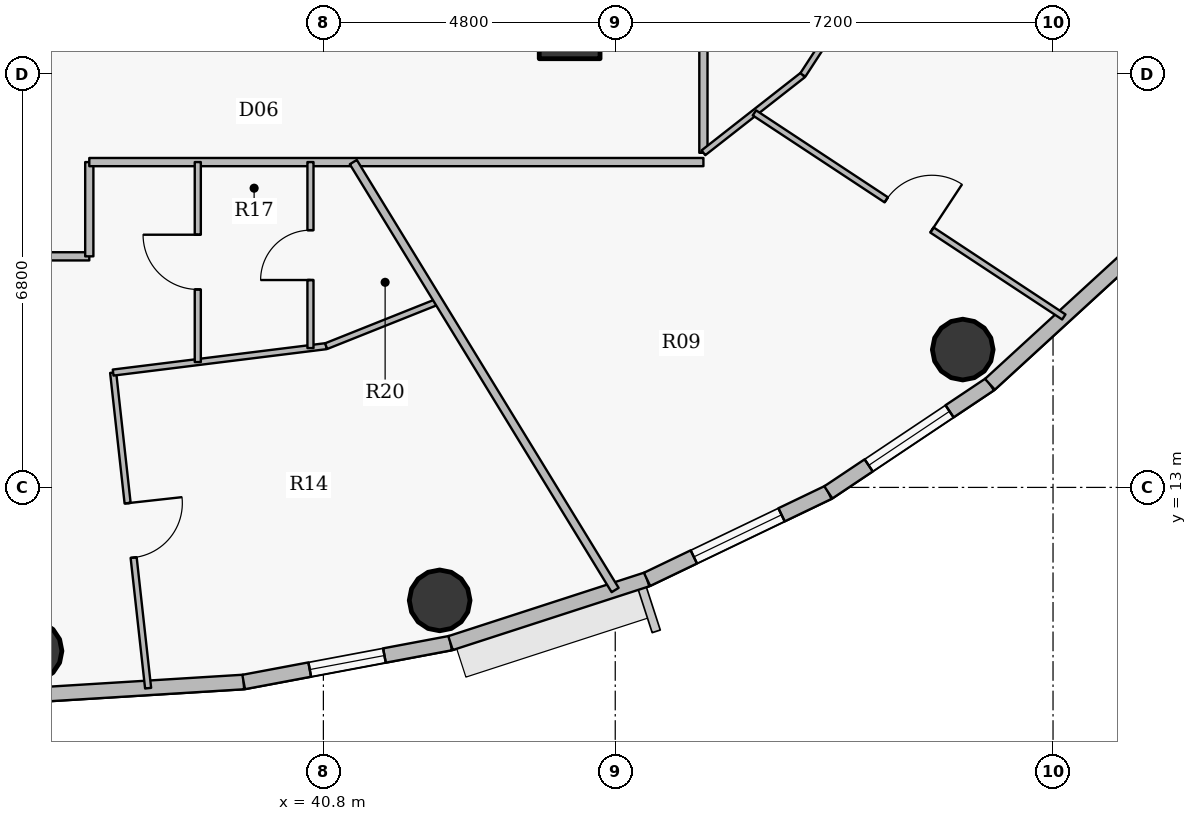
"""IFC4 building model, lengths in metres.
Left out: names, types, materials, properties, quantities, classifications, styles, units other than length and angle.
Written with IfcOpenShell. Run it as: python <this file> out.ifc"""

import sys

from ifc_helpers import new_model, si_unit, direction, frame, frame_2d, origin, origin_2d, place, context, subcontext, project, spatial, rectangle, hollow_circle, extrude, source, transform, mapped, element, fill, save


model = new_model("IFC4")
c1 = context("Model", 3, precision=1e-05, world=origin(), true_north=direction((0.0, 1.0)))
c2 = subcontext(c1, "Body", "Model", "MODEL_VIEW")
j1 = project(units=[si_unit("LENGTHUNIT", "METRE"), si_unit("PLANEANGLEUNIT", "RADIAN")], contexts=[c1])
p1 = place(None, origin())
s1 = spatial("IfcSite", under=j1, at=p1, CompositionType="ELEMENT")
p2 = place(p1, origin())
s2 = spatial("IfcBuilding", under=s1, at=p2, CompositionType="ELEMENT")
p3 = place(p2, frame((0.0, 0.0, 284.25)))
s3 = spatial("IfcBuildingStorey", under=s2, at=p3, CompositionType="ELEMENT", Elevation=284.25)
p4 = place(p3, frame((44.85, 20.55, 0.0), z_axis=(0.0, 0.0, 1.0), x_axis=(1.0, 0.0, 0.0)))
e1 = element("IfcColumn", 1, at=p4, inside=s3, PredefinedType="COLUMN", context=c2, shape_type="SweptSolid", body=[
    extrude(rectangle(XDim=1.0, YDim=1.0, at=origin_2d()), origin(), (0.0, 0.0, 1.0), 3.75),
])
for number, where, z_axis, x_axis in (
    (2, (36.0, 10.31, 0.0), (0.0, 0.0, 1.0), (1.0, 0.0, 0.0)),
    (3, (42.712, 11.142, 0.0), (0.0, 0.0, 1.0), (1.0, 0.0, 0.0)),
    (4, (51.315, 15.267, 0.0), (0.0, 0.0, 1.0), (1.0, 0.0, 0.0)),
):
    element("IfcColumn", number, at=place(p3, frame(where, z_axis=z_axis, x_axis=x_axis)), inside=s3, PredefinedType="COLUMN", context=c2, shape_type="SweptSolid", body=[
        extrude(hollow_circle(Radius=0.5, WallThickness=0.032, at=origin_2d()), origin(), (0.0, 0.0, 1.0), 3.75),
    ])
p5 = place(p3, frame((39.489, 9.8, 0.0), z_axis=(0.0, 0.0, 1.0), x_axis=(-0.998104946479, -0.061534671648, 0.0)))
e5 = element("IfcWall", 5, at=p5, inside=s3, PredefinedType="SOLIDWALL", context=c2, shape_type="SweptSolid", body=[
    extrude(rectangle(XDim=3.495, YDim=0.24, at=frame_2d((1.748, 0.0))), origin(), (0.0, 0.0, 1.0), 3.5),
])
p6 = place(p3, frame((42.891, 10.44, 0.0), z_axis=(0.0, 0.0, 1.0), x_axis=(-0.982782655757, -0.184765395959, 0.0)))
e6 = element("IfcWall", 6, at=p6, inside=s3, PredefinedType="SOLIDWALL", context=c2, shape_type="SweptSolid", body=[
    extrude(rectangle(XDim=3.462, YDim=0.24, at=frame_2d((1.731, 0.0))), origin(), (0.0, 0.0, 1.0), 3.5),
])
p7 = place(p6, frame((1.106, 0.0, 0.9)))
e7 = element("IfcOpeningElement", 7, at=p7, cuts=e6, PredefinedType="OPENING", context=c2, shape_type="SweptSolid", body=[
    extrude(rectangle(XDim=1.25, YDim=1.65, at=origin_2d()), frame((0.625, 0.13, 0.825), z_axis=(0.0, -1.0, 0.0), x_axis=(1.0, 0.0, 0.0)), (0.0, 0.0, 1.0), 0.26),
])
p8 = place(p3, frame((46.123, 11.488, 0.0), z_axis=(0.0, 0.0, 1.0), x_axis=(-0.95123136723, -0.308478339592, 0.0)))
e8 = element("IfcWall", 8, at=p8, inside=s3, PredefinedType="SOLIDWALL", context=c2, shape_type="SweptSolid", body=[
    extrude(rectangle(XDim=3.398, YDim=0.24, at=frame_2d((1.699, 0.0))), origin(), (0.0, 0.0, 1.0), 3.5),
])
p9 = place(p3, frame((49.104, 12.918, 0.0), z_axis=(0.0, 0.0, 1.0), x_axis=(-0.901573741254, -0.43262546051, 0.0)))
e9 = element("IfcWall", 9, at=p9, inside=s3, PredefinedType="SOLIDWALL", context=c2, shape_type="SweptSolid", body=[
    extrude(rectangle(XDim=3.307, YDim=0.24, at=frame_2d((1.653, 0.0))), origin(), (0.0, 0.0, 1.0), 3.5),
])
p10 = place(p9, frame((0.854, 0.0, 0.9)))
e10 = element("IfcOpeningElement", 10, at=p10, cuts=e9, PredefinedType="OPENING", context=c2, shape_type="SweptSolid", body=[
    extrude(rectangle(XDim=1.6, YDim=1.75, at=origin_2d()), frame((0.8, 0.13, 0.875), z_axis=(0.0, -1.0, 0.0), x_axis=(1.0, 0.0, 0.0)), (0.0, 0.0, 1.0), 0.26),
])
p11 = place(p3, frame((51.762, 14.696, 0.0), z_axis=(0.0, 0.0, 1.0), x_axis=(-0.831250592635, -0.55589787933, 0.0)))
e11 = element("IfcWall", 11, at=p11, inside=s3, PredefinedType="SOLIDWALL", context=c2, shape_type="SweptSolid", body=[
    extrude(rectangle(XDim=3.197, YDim=0.24, at=frame_2d((1.599, 0.0))), origin(), (0.0, 0.0, 1.0), 3.5),
])
p12 = place(p11, frame((0.799, 0.0, 0.9)))
e12 = element("IfcOpeningElement", 12, at=p12, cuts=e11, PredefinedType="OPENING", context=c2, shape_type="SweptSolid", body=[
    extrude(rectangle(XDim=1.6, YDim=1.75, at=origin_2d()), frame((0.8, 0.13, 0.875), z_axis=(0.0, -1.0, 0.0), x_axis=(1.0, 0.0, 0.0)), (0.0, 0.0, 1.0), 0.26),
])
p13 = place(p3, frame((54.03, 16.775, 0.0), z_axis=(0.0, 0.0, 1.0), x_axis=(-0.737068506972, -0.675818034703, 0.0)))
e13 = element("IfcWall", 13, at=p13, inside=s3, PredefinedType="SOLIDWALL", context=c2, shape_type="SweptSolid", body=[
    extrude(rectangle(XDim=3.077, YDim=0.24, at=frame_2d((1.539, 0.0))), origin(), (0.0, 0.0, 1.0), 3.5),
])
p14 = place(p3, frame((35.05, 16.8, 0.0), z_axis=(0.0, 0.0, 1.0), x_axis=(1.0, 0.0, 0.0)))
e14 = element("IfcWall", 14, at=p14, inside=s3, PredefinedType="PARTITIONING", context=c2, shape_type="SweptSolid", body=[
    extrude(rectangle(XDim=1.9, YDim=0.135, at=frame_2d((0.95, 0.0))), origin(), (0.0, 0.0, 1.0), 3.035),
])
p15 = place(p3, frame((36.95, 16.8, 0.0), z_axis=(0.0, 0.0, 1.0), x_axis=(0.0, 1.0, 0.0)))
e15 = element("IfcWall", 15, at=p15, inside=s3, PredefinedType="PARTITIONING", context=c2, shape_type="SweptSolid", body=[
    extrude(rectangle(XDim=1.55, YDim=0.135, at=frame_2d((0.775, 0.0))), origin(), (0.0, 0.0, 1.0), 3.5),
])
p16 = place(p3, frame((36.95, 18.35, 0.0), z_axis=(0.0, 0.0, 1.0), x_axis=(1.0, 0.0, 0.0)))
e16 = element("IfcWall", 16, at=p16, inside=s3, PredefinedType="PARTITIONING", context=c2, shape_type="SweptSolid", body=[
    extrude(rectangle(XDim=10.1, YDim=0.135, at=frame_2d((5.05, 0.0))), origin(), (0.0, 0.0, 1.0), 3.035),
])
p17 = place(p3, frame((37.342, 14.888, 0.0), z_axis=(0.0, 0.0, 1.0), x_axis=(0.110149295127, -0.993915053102, 0.0)))
e17 = element("IfcWall", 17, at=p17, inside=s3, PredefinedType="PARTITIONING", context=c2, shape_type="SweptSolid", body=[
    extrude(rectangle(XDim=5.222, YDim=0.1, at=frame_2d((2.611, 0.0))), origin(), (0.0, 0.0, 1.0), 2.985),
])
p18 = place(p17, frame((2.161, 0.0, 0.0)))
e18 = element("IfcOpeningElement", 18, at=p18, cuts=e17, PredefinedType="OPENING", context=c2, shape_type="SweptSolid", body=[
    extrude(rectangle(XDim=0.9, YDim=2.1, at=origin_2d()), frame((0.45, 0.06, 1.05), z_axis=(0.0, -1.0, 0.0), x_axis=(1.0, 0.0, 0.0)), (0.0, 0.0, 1.0), 0.12),
])
p19 = place(p3, frame((37.342, 14.888, 0.0), z_axis=(0.0, 0.0, 1.0), x_axis=(0.992393420873, 0.123106856865, 0.0)))
e19 = element("IfcWall", 19, at=p19, inside=s3, PredefinedType="PARTITIONING", context=c2, shape_type="SweptSolid", body=[
    extrude(rectangle(XDim=3.53, YDim=0.1, at=frame_2d((1.765, 0.0))), origin(), (0.0, 0.0, 1.0), 3.035),
])
p20 = place(p3, frame((38.734, 15.061, 0.0), z_axis=(0.0, 0.0, 1.0), x_axis=(0.0, 1.0, 0.0)))
e20 = element("IfcWall", 20, at=p20, inside=s3, PredefinedType="PARTITIONING", context=c2, shape_type="SweptSolid", body=[
    extrude(rectangle(XDim=3.289, YDim=0.1, at=frame_2d((1.645, 0.0))), origin(), (0.0, 0.0, 1.0), 3.5),
])
p21 = place(p20, frame((1.194, 0.0, 0.0)))
e21 = element("IfcOpeningElement", 21, at=p21, cuts=e20, PredefinedType="OPENING", context=c2, shape_type="SweptSolid", body=[
    extrude(rectangle(XDim=0.9, YDim=2.1, at=origin_2d()), frame((0.45, 0.06, 1.05), z_axis=(0.0, -1.0, 0.0), x_axis=(1.0, 0.0, 0.0)), (0.0, 0.0, 1.0), 0.12),
])
p22 = place(p3, frame((40.587, 15.291, 0.0), z_axis=(0.0, 0.0, 1.0), x_axis=(0.0, 1.0, 0.0)))
e22 = element("IfcWall", 22, at=p22, inside=s3, PredefinedType="PARTITIONING", context=c2, shape_type="SweptSolid", body=[
    extrude(rectangle(XDim=3.059, YDim=0.1, at=frame_2d((1.53, 0.0))), origin(), (0.0, 0.0, 1.0), 3.035),
])
p23 = place(p22, frame((1.119, 0.0, 0.0)))
e23 = element("IfcOpeningElement", 23, at=p23, cuts=e22, PredefinedType="OPENING", context=c2, shape_type="SweptSolid", body=[
    extrude(rectangle(XDim=0.82, YDim=2.1, at=origin_2d()), frame((0.41, 0.06, 1.05), z_axis=(0.0, -1.0, 0.0), x_axis=(1.0, 0.0, 0.0)), (0.0, 0.0, 1.0), 0.12),
])
p24 = place(p3, frame((40.845, 15.323, 0.0), z_axis=(0.0, 0.0, 1.0), x_axis=(0.928797929692, 0.370586569913, 0.0)))
e24 = element("IfcWall", 24, at=p24, inside=s3, PredefinedType="PARTITIONING", context=c2, shape_type="SweptSolid", body=[
    extrude(rectangle(XDim=1.99, YDim=0.1, at=frame_2d((0.995, 0.0))), origin(), (0.0, 0.0, 1.0), 3.035),
])
p25 = place(p3, frame((41.292, 18.35, 0.0), z_axis=(0.0, 0.0, 1.0), x_axis=(0.521891606098, -0.853011812043, 0.0)))
e25 = element("IfcWall", 25, at=p25, inside=s3, PredefinedType="PARTITIONING", context=c2, shape_type="SweptSolid", body=[
    extrude(rectangle(XDim=8.25, YDim=0.135, at=frame_2d((4.125, 0.0))), origin(), (0.0, 0.0, 1.0), 2.985),
])
p26 = place(p3, frame((47.05, 18.503, 0.0), z_axis=(0.0, 0.0, 1.0), x_axis=(0.0, 1.0, 0.0)))
e26 = element("IfcWall", 26, at=p26, inside=s3, PredefinedType="PARTITIONING", context=c2, shape_type="SweptSolid", body=[
    extrude(rectangle(XDim=16.995, YDim=0.135, at=frame_2d((8.497, 0.0))), origin(), (0.0, 0.0, 1.0), 3.035),
])
p27 = place(p26, frame((7.997, 0.0, 0.0)))
e27 = element("IfcOpeningElement", 27, at=p27, cuts=e26, PredefinedType="OPENING", context=c2, shape_type="SweptSolid", body=[
    extrude(rectangle(XDim=1.0, YDim=2.15, at=origin_2d()), frame((0.5, 0.078, 1.075), z_axis=(0.0, -1.0, 0.0), x_axis=(1.0, 0.0, 0.0)), (0.0, 0.0, 1.0), 0.155),
])
p28 = place(p3, frame((47.05, 18.503, 0.0), z_axis=(0.0, 0.0, 1.0), x_axis=(0.787328855274, 0.616533270516, 0.0)))
e28 = element("IfcWall", 28, at=p28, inside=s3, PredefinedType="PARTITIONING", context=c2, shape_type="SweptSolid", body=[
    extrude(rectangle(XDim=2.077, YDim=0.1, at=frame_2d((1.039, 0.0))), origin(), (0.0, 0.0, 1.0), 3.035),
])
p29 = place(p3, frame((47.889, 19.159, 0.0), z_axis=(0.0, 0.0, 1.0), x_axis=(0.834800486956, -0.550552583299, 0.0)))
e29 = element("IfcWall", 29, at=p29, inside=s3, PredefinedType="PARTITIONING", context=c2, shape_type="SweptSolid", body=[
    extrude(rectangle(XDim=6.096, YDim=0.1, at=frame_2d((3.048, 0.0))), origin(), (0.0, 0.0, 1.0), 2.985),
])
p30 = place(p29, frame((2.598, 0.0, 0.0)))
e30 = element("IfcOpeningElement", 30, at=p30, cuts=e29, PredefinedType="OPENING", context=c2, shape_type="SweptSolid", body=[
    extrude(rectangle(XDim=0.9, YDim=2.1, at=origin_2d()), frame((0.45, 0.06, 1.05), z_axis=(0.0, -1.0, 0.0), x_axis=(1.0, 0.0, 0.0)), (0.0, 0.0, 1.0), 0.12),
])
p31 = place(p3, frame((48.685, 19.783, 0.0), z_axis=(0.0, 0.0, 1.0), x_axis=(0.545435886628, 0.838152547916, 0.0)))
e31 = element("IfcWall", 31, at=p31, inside=s3, PredefinedType="PARTITIONING", context=c2, shape_type="SweptSolid", body=[
    extrude(rectangle(XDim=4.083, YDim=0.1, at=frame_2d((2.042, 0.0))), origin(), (0.0, 0.0, 1.0), 3.035),
])
p32 = place(p31, frame((1.592, 0.0, 0.0)))
e32 = element("IfcOpeningElement", 32, at=p32, cuts=e31, PredefinedType="OPENING", context=c2, shape_type="SweptSolid", body=[
    extrude(rectangle(XDim=0.9, YDim=2.1, at=origin_2d()), frame((0.45, 0.06, 1.05), z_axis=(0.0, -1.0, 0.0), x_axis=(1.0, 0.0, 0.0)), (0.0, 0.0, 1.0), 0.12),
])
p33 = place(p3, frame((44.36, 20.2, 0.0), z_axis=(0.0, 0.0, 1.0), x_axis=(1.0, 0.0, 0.0)))
e33 = element("IfcWall", 33, at=p33, inside=s3, PredefinedType="PARTITIONING", context=c2, shape_type="SweptSolid", body=[
    extrude(rectangle(XDim=0.84, YDim=0.135, at=frame_2d((0.42, 0.0))), origin(), (0.0, 0.0, 1.0), 3.035),
])
m1 = source(origin(), c2, "Body", "SweptSolid", [
    extrude(rectangle(XDim=1.6, YDim=1.75, at=origin_2d()), frame((0.8, 0.03, 0.875), z_axis=(0.0, -1.0, 0.0), x_axis=(1.0, 0.0, 0.0)), (0.0, 0.0, 1.0), 0.06),
])
p34 = place(p10, origin())
e34 = element("IfcWindow", 34, at=p34, inside=s3, PartitioningType="DOUBLE_PANEL_VERTICAL", PredefinedType="WINDOW", context=c2, shape_type="MappedRepresentation", body=[
    mapped(m1, transform((0.0, 0.0, 0.0), x_axis=(1.0, 0.0, 0.0), y_axis=(0.0, 1.0, 0.0), z_axis=(0.0, 0.0, 1.0), scale=1.0)),
])
fill(e10, e34)
p35 = place(p12, origin())
e35 = element("IfcWindow", 35, at=p35, inside=s3, PartitioningType="DOUBLE_PANEL_VERTICAL", PredefinedType="WINDOW", context=c2, shape_type="MappedRepresentation", body=[
    mapped(m1, transform((0.0, 0.0, 0.0), x_axis=(1.0, 0.0, 0.0), y_axis=(0.0, 1.0, 0.0), z_axis=(0.0, 0.0, 1.0), scale=1.0)),
])
fill(e12, e35)
m2 = source(origin(), c2, "Body", "SweptSolid", [
    extrude(rectangle(XDim=1.25, YDim=1.65, at=origin_2d()), frame((0.625, 0.03, 0.825), z_axis=(0.0, -1.0, 0.0), x_axis=(1.0, 0.0, 0.0)), (0.0, 0.0, 1.0), 0.06),
])
p36 = place(p7, origin())
e36 = element("IfcWindow", 36, at=p36, inside=s3, PartitioningType="SINGLE_PANEL", PredefinedType="WINDOW", context=c2, shape_type="MappedRepresentation", body=[
    mapped(m2, transform((0.0, 0.0, 0.0), x_axis=(1.0, 0.0, 0.0), y_axis=(0.0, 1.0, 0.0), z_axis=(0.0, 0.0, 1.0), scale=1.0)),
])
fill(e7, e36)
m3 = source(origin(), c2, "Body", "SweptSolid", [
    extrude(rectangle(XDim=0.9, YDim=2.1, at=origin_2d()), frame((0.45, 0.025, 1.05), z_axis=(0.0, -1.0, 0.0), x_axis=(1.0, 0.0, 0.0)), (0.0, 0.0, 1.0), 0.05),
])
p37 = place(p18, origin())
e37 = element("IfcDoor", 37, at=p37, inside=s3, OperationType="SINGLE_SWING_LEFT", PredefinedType="DOOR", context=c2, shape_type="MappedRepresentation", body=[
    mapped(m3, transform((0.0, 0.0, 0.0), x_axis=(1.0, 0.0, 0.0), y_axis=(0.0, 1.0, 0.0), z_axis=(0.0, 0.0, 1.0), scale=1.0)),
])
fill(e18, e37)
p38 = place(p21, origin())
e38 = element("IfcDoor", 38, at=p38, inside=s3, OperationType="SINGLE_SWING_RIGHT", PredefinedType="DOOR", context=c2, shape_type="MappedRepresentation", body=[
    mapped(m3, transform((0.0, 0.0, 0.0), x_axis=(1.0, 0.0, 0.0), y_axis=(0.0, 1.0, 0.0), z_axis=(0.0, 0.0, 1.0), scale=1.0)),
])
fill(e21, e38)
m4 = source(origin(), c2, "Body", "SweptSolid", [
    extrude(rectangle(XDim=0.82, YDim=2.1, at=origin_2d()), frame((0.41, 0.025, 1.05), z_axis=(0.0, -1.0, 0.0), x_axis=(1.0, 0.0, 0.0)), (0.0, 0.0, 1.0), 0.05),
])
p39 = place(p23, origin())
e39 = element("IfcDoor", 39, at=p39, inside=s3, OperationType="SINGLE_SWING_LEFT", PredefinedType="DOOR", context=c2, shape_type="MappedRepresentation", body=[
    mapped(m4, transform((0.0, 0.0, 0.0), x_axis=(1.0, 0.0, 0.0), y_axis=(0.0, 1.0, 0.0), z_axis=(0.0, 0.0, 1.0), scale=1.0)),
])
fill(e23, e39)
p40 = place(p30, origin())
e40 = element("IfcDoor", 40, at=p40, inside=s3, OperationType="SINGLE_SWING_RIGHT", PredefinedType="DOOR", context=c2, shape_type="MappedRepresentation", body=[
    mapped(m3, transform((0.0, 0.0, 0.0), x_axis=(1.0, 0.0, 0.0), y_axis=(0.0, 1.0, 0.0), z_axis=(0.0, 0.0, 1.0), scale=1.0)),
])
fill(e30, e40)
save(model, sys.argv[1])
